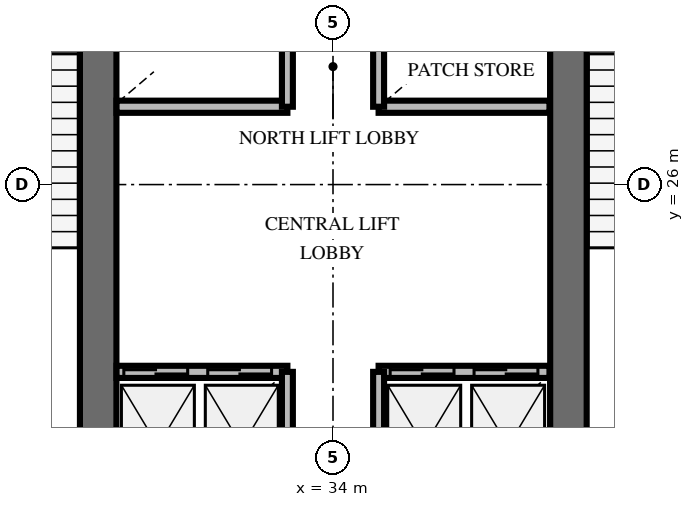
"""IFC4 building model, lengths in metres.
Left out: names, types, materials, properties, quantities, classifications, styles, units other than length and angle.
Written with IfcOpenShell. Run it as: python <this file> out.ifc"""

import sys

from ifc_helpers import new_model, si_unit, direction, frame, frame_2d, origin, place, context, subcontext, project, spatial, rectangle, extrude, element, fill, save


model = new_model("IFC4")
c1 = context("Model", 3, precision=1e-05, world=origin(), true_north=direction((0.0, 1.0)))
c2 = subcontext(c1, "Body", "Model", "MODEL_VIEW")
j1 = project(units=[si_unit("LENGTHUNIT", "METRE"), si_unit("PLANEANGLEUNIT", "RADIAN")], contexts=[c1])
p1 = place(None, origin())
s1 = spatial("IfcSite", under=j1, at=p1, CompositionType="ELEMENT")
p2 = place(p1, origin())
s2 = spatial("IfcBuilding", under=s1, at=p2, CompositionType="ELEMENT")
p3 = place(p2, frame((0.0, 0.0, 51.0)))
s3 = spatial("IfcBuildingStorey", under=s2, at=p3, CompositionType="ELEMENT", Elevation=51.0)
for number, where, z_axis, x_axis in (
    (1, (30.138, 20.112, 0.0), (0.0, 0.0, 1.0), (0.0, 1.0, 0.0)),
    (2, (37.872, 20.112, 0.0), (0.0, 0.0, 1.0), (0.0, 1.0, 0.0)),
):
    element("IfcWall", number, at=place(p3, frame(where, z_axis=z_axis, x_axis=x_axis)), inside=s3, PredefinedType="SHEAR", context=c2, shape_type="SweptSolid", body=[
        extrude(rectangle(XDim=9.976, YDim=0.6, at=frame_2d((4.988, 0.0))), origin(), (0.0, 0.0, 1.0), 4.2),
    ])
p4 = place(p3, frame((30.44, 22.92, 0.0), z_axis=(0.0, 0.0, 1.0), x_axis=(1.0, 0.0, 0.0)))
e3 = element("IfcWall", 3, at=p4, inside=s3, PredefinedType="SOLIDWALL", context=c2, shape_type="SweptSolid", body=[
    extrude(rectangle(XDim=2.81, YDim=0.2, at=frame_2d((1.405, 0.0))), origin(), (0.0, 0.0, 1.0), 3.0),
])
p5 = place(p4, frame((0.12, 0.0, 0.0)))
e4 = element("IfcOpeningElement", 4, at=p5, cuts=e3, PredefinedType="OPENING", context=c2, shape_type="SweptSolid", body=[
    extrude(rectangle(XDim=1.05, YDim=2.1, at=frame_2d((0.525, 1.05))), frame((0.0, 0.11, 0.0), z_axis=(0.0, -1.0, 0.0), x_axis=(1.0, 0.0, 0.0)), (0.0, 0.0, 1.0), 0.22),
])
p6 = place(p4, frame((1.5, 0.0, 0.0)))
e5 = element("IfcOpeningElement", 5, at=p6, cuts=e3, PredefinedType="OPENING", context=c2, shape_type="SweptSolid", body=[
    extrude(rectangle(XDim=1.05, YDim=2.1, at=frame_2d((0.525, 1.05))), frame((0.0, 0.11, 0.0), z_axis=(0.0, -1.0, 0.0), x_axis=(1.0, 0.0, 0.0)), (0.0, 0.0, 1.0), 0.22),
])
p7 = place(p3, frame((33.25, 20.5, 0.0), z_axis=(0.0, 0.0, 1.0), x_axis=(0.0, 1.0, 0.0)))
e6 = element("IfcWall", 6, at=p7, inside=s3, PredefinedType="SOLIDWALL", context=c2, shape_type="SweptSolid", body=[
    extrude(rectangle(XDim=2.42, YDim=0.18, at=frame_2d((1.21, 0.0))), origin(), (0.0, 0.0, 1.0), 3.0),
])
p8 = place(p3, frame((34.75, 22.92, 0.0), z_axis=(0.0, 0.0, 1.0), x_axis=(1.0, 0.0, 0.0)))
e7 = element("IfcWall", 7, at=p8, inside=s3, PredefinedType="SOLIDWALL", context=c2, shape_type="SweptSolid", body=[
    extrude(rectangle(XDim=2.81, YDim=0.2, at=frame_2d((1.405, 0.0))), origin(), (0.0, 0.0, 1.0), 3.0),
])
p9 = place(p8, frame((0.19, 0.0, 0.0)))
e8 = element("IfcOpeningElement", 8, at=p9, cuts=e7, PredefinedType="OPENING", context=c2, shape_type="SweptSolid", body=[
    extrude(rectangle(XDim=1.05, YDim=2.1, at=frame_2d((0.525, 1.05))), frame((0.0, 0.11, 0.0), z_axis=(0.0, -1.0, 0.0), x_axis=(1.0, 0.0, 0.0)), (0.0, 0.0, 1.0), 0.22),
])
p10 = place(p8, frame((1.57, 0.0, 0.0)))
e9 = element("IfcOpeningElement", 9, at=p10, cuts=e7, PredefinedType="OPENING", context=c2, shape_type="SweptSolid", body=[
    extrude(rectangle(XDim=1.05, YDim=2.1, at=frame_2d((0.525, 1.05))), frame((0.0, 0.11, 0.0), z_axis=(0.0, -1.0, 0.0), x_axis=(1.0, 0.0, 0.0)), (0.0, 0.0, 1.0), 0.22),
])
p11 = place(p3, frame((34.75, 20.5, 0.0), z_axis=(0.0, 0.0, 1.0), x_axis=(0.0, 1.0, 0.0)))
e10 = element("IfcWall", 10, at=p11, inside=s3, PredefinedType="SOLIDWALL", context=c2, shape_type="SweptSolid", body=[
    extrude(rectangle(XDim=2.42, YDim=0.18, at=frame_2d((1.21, 0.0))), origin(), (0.0, 0.0, 1.0), 3.0),
])
p12 = place(p3, frame((30.44, 27.28, 0.0), z_axis=(0.0, 0.0, 1.0), x_axis=(1.0, 0.0, 0.0)))
e11 = element("IfcWall", 11, at=p12, inside=s3, PredefinedType="SOLIDWALL", context=c2, shape_type="SweptSolid", body=[
    extrude(rectangle(XDim=2.81, YDim=0.2, at=frame_2d((1.405, 0.0))), origin(), (0.0, 0.0, 1.0), 3.0),
])
p13 = place(p3, frame((33.25, 27.28, 0.0), z_axis=(0.0, 0.0, 1.0), x_axis=(0.0, 1.0, 0.0)))
e12 = element("IfcWall", 12, at=p13, inside=s3, PredefinedType="SOLIDWALL", context=c2, shape_type="SweptSolid", body=[
    extrude(rectangle(XDim=2.47, YDim=0.18, at=frame_2d((1.235, 0.0))), origin(), (0.0, 0.0, 1.0), 3.0),
])
p14 = place(p3, frame((34.75, 27.28, 0.0), z_axis=(0.0, 0.0, 1.0), x_axis=(1.0, 0.0, 0.0)))
e13 = element("IfcWall", 13, at=p14, inside=s3, PredefinedType="SOLIDWALL", context=c2, shape_type="SweptSolid", body=[
    extrude(rectangle(XDim=2.81, YDim=0.2, at=frame_2d((1.405, 0.0))), origin(), (0.0, 0.0, 1.0), 3.0),
])
p15 = place(p3, frame((34.75, 27.28, 0.0), z_axis=(0.0, 0.0, 1.0), x_axis=(0.0, 1.0, 0.0)))
e14 = element("IfcWall", 14, at=p15, inside=s3, PredefinedType="SOLIDWALL", context=c2, shape_type="SweptSolid", body=[
    extrude(rectangle(XDim=2.47, YDim=0.18, at=frame_2d((1.235, 0.0))), origin(), (0.0, 0.0, 1.0), 3.0),
])
p16 = place(p5, origin())
e15 = element("IfcDoor", 15, at=p16, inside=s3, OperationType="DOUBLE_DOOR_SLIDING", PredefinedType="USERDEFINED", context=c2, shape_type="SweptSolid", body=[
    extrude(rectangle(XDim=1.05, YDim=2.1, at=frame_2d((0.525, 1.05))), frame((0.0, 0.025, 0.0), z_axis=(0.0, -1.0, 0.0), x_axis=(1.0, 0.0, 0.0)), (0.0, 0.0, 1.0), 0.05),
])
fill(e4, e15)
p17 = place(p6, origin())
e16 = element("IfcDoor", 16, at=p17, inside=s3, OperationType="DOUBLE_DOOR_SLIDING", PredefinedType="USERDEFINED", context=c2, shape_type="SweptSolid", body=[
    extrude(rectangle(XDim=1.05, YDim=2.1, at=frame_2d((0.525, 1.05))), frame((0.0, 0.025, 0.0), z_axis=(0.0, -1.0, 0.0), x_axis=(1.0, 0.0, 0.0)), (0.0, 0.0, 1.0), 0.05),
])
fill(e5, e16)
p18 = place(p9, origin())
e17 = element("IfcDoor", 17, at=p18, inside=s3, OperationType="DOUBLE_DOOR_SLIDING", PredefinedType="USERDEFINED", context=c2, shape_type="SweptSolid", body=[
    extrude(rectangle(XDim=1.05, YDim=2.1, at=frame_2d((0.525, 1.05))), frame((0.0, 0.025, 0.0), z_axis=(0.0, -1.0, 0.0), x_axis=(1.0, 0.0, 0.0)), (0.0, 0.0, 1.0), 0.05),
])
fill(e8, e17)
p19 = place(p10, origin())
e18 = element("IfcDoor", 18, at=p19, inside=s3, OperationType="DOUBLE_DOOR_SLIDING", PredefinedType="USERDEFINED", context=c2, shape_type="SweptSolid", body=[
    extrude(rectangle(XDim=1.05, YDim=2.1, at=frame_2d((0.525, 1.05))), frame((0.0, 0.025, 0.0), z_axis=(0.0, -1.0, 0.0), x_axis=(1.0, 0.0, 0.0)), (0.0, 0.0, 1.0), 0.05),
])
fill(e9, e18)
save(model, sys.argv[1])
